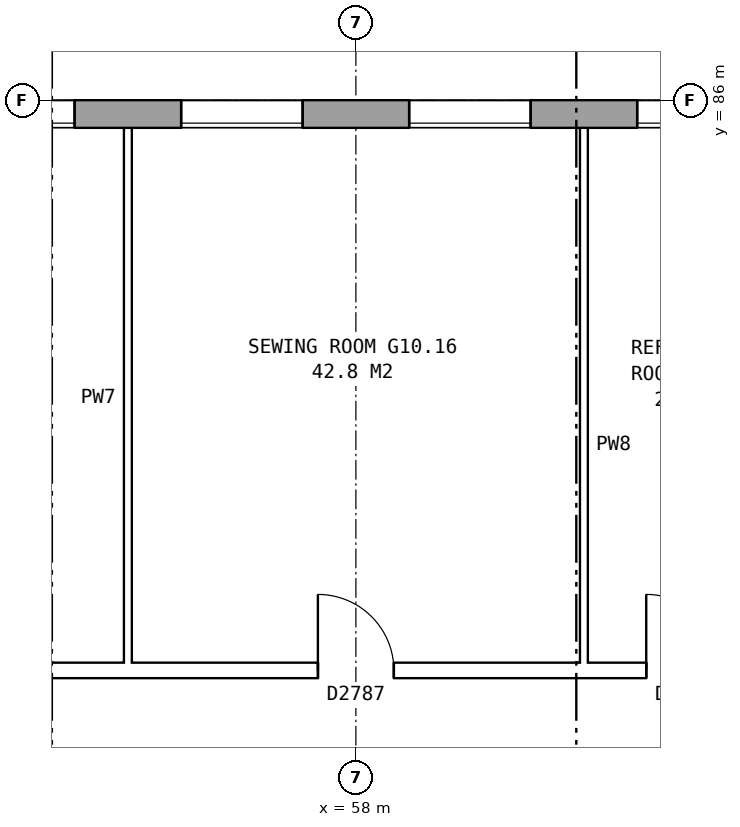
"""IFC4 building model, lengths in metres.
Left out: names, types, materials, properties, quantities, classifications, styles, units other than length and angle.
Written with IfcOpenShell. Run it as: python <this file> out.ifc"""

import sys

from ifc_helpers import new_model, si_unit, direction, frame, frame_2d, origin, place, context, subcontext, project, spatial, rectangle, extrude, element, fill, save


model = new_model("IFC4")
c1 = context("Model", 3, precision=1e-05, world=origin(), true_north=direction((0.0, 1.0)))
c2 = subcontext(c1, "Body", "Model", "MODEL_VIEW")
j1 = project(units=[si_unit("LENGTHUNIT", "METRE"), si_unit("PLANEANGLEUNIT", "RADIAN")], contexts=[c1])
p1 = place(None, origin())
s1 = spatial("IfcSite", under=j1, at=p1, CompositionType="ELEMENT")
p2 = place(p1, origin())
s2 = spatial("IfcBuilding", under=s1, at=p2, CompositionType="ELEMENT")
p3 = place(p2, frame((0.0, 0.0, 38.1)))
s3 = spatial("IfcBuildingStorey", under=s2, at=p3, CompositionType="ELEMENT", Elevation=38.1)
p4 = place(p3, frame((72.925, 85.82, 0.0), z_axis=(0.0, 0.0, 1.0), x_axis=(-1.0, 0.0, 0.0)))
e1 = element("IfcWall", 1, at=p4, inside=s3, PredefinedType="STANDARD", context=c2, shape_type="SweptSolid", body=[
    extrude(rectangle(XDim=48.351, YDim=0.36, at=frame_2d((24.175, 0.0))), origin(), (0.0, 0.0, 1.0), 5.6),
])
p5 = place(p4, frame((0.625, 0.0, 0.15)))
e2 = element("IfcOpeningElement", 2, at=p5, cuts=e1, PredefinedType="OPENING", context=c2, shape_type="SweptSolid", body=[
    extrude(rectangle(XDim=1.6, YDim=2.4, at=frame_2d((0.8, 1.2))), frame((0.0, 0.19, 0.0), z_axis=(0.0, -1.0, 0.0), x_axis=(1.0, 0.0, 0.0)), (0.0, 0.0, 1.0), 0.38),
])
p6 = place(p4, frame((3.625, 0.0, 0.15)))
e3 = element("IfcOpeningElement", 3, at=p6, cuts=e1, PredefinedType="OPENING", context=c2, shape_type="SweptSolid", body=[
    extrude(rectangle(XDim=1.6, YDim=2.4, at=frame_2d((0.8, 1.2))), frame((0.0, 0.19, 0.0), z_axis=(0.0, -1.0, 0.0), x_axis=(1.0, 0.0, 0.0)), (0.0, 0.0, 1.0), 0.38),
])
p7 = place(p4, frame((6.625, 0.0, 0.15)))
e4 = element("IfcOpeningElement", 4, at=p7, cuts=e1, PredefinedType="OPENING", context=c2, shape_type="SweptSolid", body=[
    extrude(rectangle(XDim=1.6, YDim=2.4, at=frame_2d((0.8, 1.2))), frame((0.0, 0.19, 0.0), z_axis=(0.0, -1.0, 0.0), x_axis=(1.0, 0.0, 0.0)), (0.0, 0.0, 1.0), 0.38),
])
p8 = place(p4, frame((9.625, 0.0, 0.15)))
e5 = element("IfcOpeningElement", 5, at=p8, cuts=e1, PredefinedType="OPENING", context=c2, shape_type="SweptSolid", body=[
    extrude(rectangle(XDim=1.6, YDim=2.4, at=frame_2d((0.8, 1.2))), frame((0.0, 0.19, 0.0), z_axis=(0.0, -1.0, 0.0), x_axis=(1.0, 0.0, 0.0)), (0.0, 0.0, 1.0), 0.38),
])
p9 = place(p4, frame((12.625, 0.0, 0.15)))
e6 = element("IfcOpeningElement", 6, at=p9, cuts=e1, PredefinedType="OPENING", context=c2, shape_type="SweptSolid", body=[
    extrude(rectangle(XDim=1.6, YDim=2.4, at=frame_2d((0.8, 1.2))), frame((0.0, 0.19, 0.0), z_axis=(0.0, -1.0, 0.0), x_axis=(1.0, 0.0, 0.0)), (0.0, 0.0, 1.0), 0.38),
])
p10 = place(p4, frame((15.625, 0.0, 0.15)))
e7 = element("IfcOpeningElement", 7, at=p10, cuts=e1, PredefinedType="OPENING", context=c2, shape_type="SweptSolid", body=[
    extrude(rectangle(XDim=1.6, YDim=2.4, at=frame_2d((0.8, 1.2))), frame((0.0, 0.19, 0.0), z_axis=(0.0, -1.0, 0.0), x_axis=(1.0, 0.0, 0.0)), (0.0, 0.0, 1.0), 0.38),
])
p11 = place(p4, frame((18.625, 0.0, 0.15)))
e8 = element("IfcOpeningElement", 8, at=p11, cuts=e1, PredefinedType="OPENING", context=c2, shape_type="SweptSolid", body=[
    extrude(rectangle(XDim=1.6, YDim=2.4, at=frame_2d((0.8, 1.2))), frame((0.0, 0.19, 0.0), z_axis=(0.0, -1.0, 0.0), x_axis=(1.0, 0.0, 0.0)), (0.0, 0.0, 1.0), 0.38),
])
p12 = place(p4, frame((21.625, 0.0, 0.15)))
e9 = element("IfcOpeningElement", 9, at=p12, cuts=e1, PredefinedType="OPENING", context=c2, shape_type="SweptSolid", body=[
    extrude(rectangle(XDim=1.6, YDim=2.4, at=frame_2d((0.8, 1.2))), frame((0.0, 0.19, 0.0), z_axis=(0.0, -1.0, 0.0), x_axis=(1.0, 0.0, 0.0)), (0.0, 0.0, 1.0), 0.38),
])
p13 = place(p4, frame((24.625, 0.0, 0.15)))
e10 = element("IfcOpeningElement", 10, at=p13, cuts=e1, PredefinedType="OPENING", context=c2, shape_type="SweptSolid", body=[
    extrude(rectangle(XDim=1.6, YDim=2.4, at=frame_2d((0.8, 1.2))), frame((0.0, 0.19, 0.0), z_axis=(0.0, -1.0, 0.0), x_axis=(1.0, 0.0, 0.0)), (0.0, 0.0, 1.0), 0.38),
])
p14 = place(p4, frame((27.625, 0.0, 0.15)))
e11 = element("IfcOpeningElement", 11, at=p14, cuts=e1, PredefinedType="OPENING", context=c2, shape_type="SweptSolid", body=[
    extrude(rectangle(XDim=1.6, YDim=2.4, at=frame_2d((0.8, 1.2))), frame((0.0, 0.19, 0.0), z_axis=(0.0, -1.0, 0.0), x_axis=(1.0, 0.0, 0.0)), (0.0, 0.0, 1.0), 0.38),
])
p15 = place(p4, frame((30.625, 0.0, 0.15)))
e12 = element("IfcOpeningElement", 12, at=p15, cuts=e1, PredefinedType="OPENING", context=c2, shape_type="SweptSolid", body=[
    extrude(rectangle(XDim=1.6, YDim=2.4, at=frame_2d((0.8, 1.2))), frame((0.0, 0.19, 0.0), z_axis=(0.0, -1.0, 0.0), x_axis=(1.0, 0.0, 0.0)), (0.0, 0.0, 1.0), 0.38),
])
p16 = place(p4, frame((33.625, 0.0, 0.15)))
e13 = element("IfcOpeningElement", 13, at=p16, cuts=e1, PredefinedType="OPENING", context=c2, shape_type="SweptSolid", body=[
    extrude(rectangle(XDim=1.6, YDim=2.4, at=frame_2d((0.8, 1.2))), frame((0.0, 0.19, 0.0), z_axis=(0.0, -1.0, 0.0), x_axis=(1.0, 0.0, 0.0)), (0.0, 0.0, 1.0), 0.38),
])
p17 = place(p4, frame((36.625, 0.0, 0.15)))
e14 = element("IfcOpeningElement", 14, at=p17, cuts=e1, PredefinedType="OPENING", context=c2, shape_type="SweptSolid", body=[
    extrude(rectangle(XDim=1.6, YDim=2.4, at=frame_2d((0.8, 1.2))), frame((0.0, 0.19, 0.0), z_axis=(0.0, -1.0, 0.0), x_axis=(1.0, 0.0, 0.0)), (0.0, 0.0, 1.0), 0.38),
])
p18 = place(p4, frame((39.625, 0.0, 0.15)))
e15 = element("IfcOpeningElement", 15, at=p18, cuts=e1, PredefinedType="OPENING", context=c2, shape_type="SweptSolid", body=[
    extrude(rectangle(XDim=1.6, YDim=2.4, at=frame_2d((0.8, 1.2))), frame((0.0, 0.19, 0.0), z_axis=(0.0, -1.0, 0.0), x_axis=(1.0, 0.0, 0.0)), (0.0, 0.0, 1.0), 0.38),
])
p19 = place(p4, frame((42.625, 0.0, 0.15)))
e16 = element("IfcOpeningElement", 16, at=p19, cuts=e1, PredefinedType="OPENING", context=c2, shape_type="SweptSolid", body=[
    extrude(rectangle(XDim=1.6, YDim=2.4, at=frame_2d((0.8, 1.2))), frame((0.0, 0.19, 0.0), z_axis=(0.0, -1.0, 0.0), x_axis=(1.0, 0.0, 0.0)), (0.0, 0.0, 1.0), 0.38),
])
p20 = place(p4, frame((45.625, 0.0, 0.15)))
e17 = element("IfcOpeningElement", 17, at=p20, cuts=e1, PredefinedType="OPENING", context=c2, shape_type="SweptSolid", body=[
    extrude(rectangle(XDim=1.6, YDim=2.4, at=frame_2d((0.8, 1.2))), frame((0.0, 0.19, 0.0), z_axis=(0.0, -1.0, 0.0), x_axis=(1.0, 0.0, 0.0)), (0.0, 0.0, 1.0), 0.38),
])
p21 = place(p3, frame((24.9, 78.5, 0.0), z_axis=(0.0, 0.0, 1.0), x_axis=(1.0, 0.0, 0.0)))
e18 = element("IfcWall", 18, at=p21, inside=s3, PredefinedType="PARTITIONING", context=c2, shape_type="SweptSolid", body=[
    extrude(rectangle(XDim=50.86, YDim=0.2, at=frame_2d((25.43, 0.0))), origin(), (0.0, 0.0, 1.0), 5.6),
])
p22 = place(p21, frame((3.5, 0.0, 0.0)))
e19 = element("IfcOpeningElement", 19, at=p22, cuts=e18, PredefinedType="OPENING", context=c2, shape_type="SweptSolid", body=[
    extrude(rectangle(XDim=1.0, YDim=2.1, at=frame_2d((0.5, 1.05))), frame((0.0, 0.11, 0.0), z_axis=(0.0, -1.0, 0.0), x_axis=(1.0, 0.0, 0.0)), (0.0, 0.0, 1.0), 0.22),
])
p23 = place(p21, frame((8.6, 0.0, 0.0)))
e20 = element("IfcOpeningElement", 20, at=p23, cuts=e18, PredefinedType="OPENING", context=c2, shape_type="SweptSolid", body=[
    extrude(rectangle(XDim=1.0, YDim=2.1, at=frame_2d((0.5, 1.05))), frame((0.0, 0.11, 0.0), z_axis=(0.0, -1.0, 0.0), x_axis=(1.0, 0.0, 0.0)), (0.0, 0.0, 1.0), 0.22),
])
p24 = place(p21, frame((15.5, 0.0, 0.0)))
e21 = element("IfcOpeningElement", 21, at=p24, cuts=e18, PredefinedType="OPENING", context=c2, shape_type="SweptSolid", body=[
    extrude(rectangle(XDim=1.0, YDim=2.1, at=frame_2d((0.5, 1.05))), frame((0.0, 0.11, 0.0), z_axis=(0.0, -1.0, 0.0), x_axis=(1.0, 0.0, 0.0)), (0.0, 0.0, 1.0), 0.22),
])
p25 = place(p21, frame((20.6, 0.0, 0.0)))
e22 = element("IfcOpeningElement", 22, at=p25, cuts=e18, PredefinedType="OPENING", context=c2, shape_type="SweptSolid", body=[
    extrude(rectangle(XDim=1.0, YDim=2.1, at=frame_2d((0.5, 1.05))), frame((0.0, 0.11, 0.0), z_axis=(0.0, -1.0, 0.0), x_axis=(1.0, 0.0, 0.0)), (0.0, 0.0, 1.0), 0.22),
])
p26 = place(p21, frame((27.5, 0.0, 0.0)))
e23 = element("IfcOpeningElement", 23, at=p26, cuts=e18, PredefinedType="OPENING", context=c2, shape_type="SweptSolid", body=[
    extrude(rectangle(XDim=1.0, YDim=2.1, at=frame_2d((0.5, 1.05))), frame((0.0, 0.11, 0.0), z_axis=(0.0, -1.0, 0.0), x_axis=(1.0, 0.0, 0.0)), (0.0, 0.0, 1.0), 0.22),
])
p27 = place(p21, frame((32.6, 0.0, 0.0)))
e24 = element("IfcOpeningElement", 24, at=p27, cuts=e18, PredefinedType="OPENING", context=c2, shape_type="SweptSolid", body=[
    extrude(rectangle(XDim=1.0, YDim=2.1, at=frame_2d((0.5, 1.05))), frame((0.0, 0.11, 0.0), z_axis=(0.0, -1.0, 0.0), x_axis=(1.0, 0.0, 0.0)), (0.0, 0.0, 1.0), 0.22),
])
p28 = place(p21, frame((36.92, 0.0, 0.0)))
e25 = element("IfcOpeningElement", 25, at=p28, cuts=e18, PredefinedType="OPENING", context=c2, shape_type="SweptSolid", body=[
    extrude(rectangle(XDim=1.0, YDim=2.1, at=frame_2d((0.5, 1.05))), frame((0.0, 0.11, 0.0), z_axis=(0.0, -1.0, 0.0), x_axis=(1.0, 0.0, 0.0)), (0.0, 0.0, 1.0), 0.22),
])
p29 = place(p21, frame((39.97, 0.0, 0.0)))
e26 = element("IfcOpeningElement", 26, at=p29, cuts=e18, PredefinedType="OPENING", context=c2, shape_type="SweptSolid", body=[
    extrude(rectangle(XDim=0.9, YDim=2.1, at=frame_2d((0.45, 1.05))), frame((0.0, 0.11, 0.0), z_axis=(0.0, -1.0, 0.0), x_axis=(1.0, 0.0, 0.0)), (0.0, 0.0, 1.0), 0.22),
])
p30 = place(p21, frame((43.15, 0.0, 0.0)))
e27 = element("IfcOpeningElement", 27, at=p30, cuts=e18, PredefinedType="OPENING", context=c2, shape_type="SweptSolid", body=[
    extrude(rectangle(XDim=0.9, YDim=2.1, at=frame_2d((0.45, 1.05))), frame((0.0, 0.11, 0.0), z_axis=(0.0, -1.0, 0.0), x_axis=(1.0, 0.0, 0.0)), (0.0, 0.0, 1.0), 0.22),
])
p31 = place(p21, frame((46.15, 0.0, 0.0)))
e28 = element("IfcOpeningElement", 28, at=p31, cuts=e18, PredefinedType="OPENING", context=c2, shape_type="SweptSolid", body=[
    extrude(rectangle(XDim=0.9, YDim=2.1, at=frame_2d((0.45, 1.05))), frame((0.0, 0.11, 0.0), z_axis=(0.0, -1.0, 0.0), x_axis=(1.0, 0.0, 0.0)), (0.0, 0.0, 1.0), 0.22),
])
p32 = place(p21, frame((48.92, 0.0, 0.0)))
e29 = element("IfcOpeningElement", 29, at=p32, cuts=e18, PredefinedType="OPENING", context=c2, shape_type="SweptSolid", body=[
    extrude(rectangle(XDim=1.0, YDim=2.1, at=frame_2d((0.5, 1.05))), frame((0.0, 0.11, 0.0), z_axis=(0.0, -1.0, 0.0), x_axis=(1.0, 0.0, 0.0)), (0.0, 0.0, 1.0), 0.22),
])
for number, where, z_axis, x_axis in (
    (30, (55.0, 78.4, 0.0), (0.0, 0.0, 1.0), (0.0, 1.0, 0.0)),
    (31, (61.0, 78.4, 0.0), (0.0, 0.0, 1.0), (0.0, 1.0, 0.0)),
):
    element("IfcWall", number, at=place(p3, frame(where, z_axis=z_axis, x_axis=x_axis)), inside=s3, PredefinedType="PARTITIONING", context=c2, shape_type="SweptSolid", body=[
        extrude(rectangle(XDim=7.36, YDim=0.1, at=frame_2d((3.68, 0.0))), origin(), (0.0, 0.0, 1.0), 5.6),
    ])
p33 = place(p8, origin())
e32 = element("IfcWindow", 32, at=p33, inside=s3, PartitioningType="SINGLE_PANEL", PredefinedType="WINDOW", context=c2, shape_type="SweptSolid", body=[
    extrude(rectangle(XDim=1.6, YDim=2.4, at=frame_2d((0.8, 1.2))), frame((0.0, 0.15, 0.0), z_axis=(0.0, -1.0, 0.0), x_axis=(1.0, 0.0, 0.0)), (0.0, 0.0, 1.0), 0.06),
])
fill(e5, e32)
p34 = place(p9, origin())
e33 = element("IfcWindow", 33, at=p34, inside=s3, PartitioningType="SINGLE_PANEL", PredefinedType="WINDOW", context=c2, shape_type="SweptSolid", body=[
    extrude(rectangle(XDim=1.6, YDim=2.4, at=frame_2d((0.8, 1.2))), frame((0.0, 0.15, 0.0), z_axis=(0.0, -1.0, 0.0), x_axis=(1.0, 0.0, 0.0)), (0.0, 0.0, 1.0), 0.06),
])
fill(e6, e33)
p35 = place(p10, origin())
e34 = element("IfcWindow", 34, at=p35, inside=s3, PartitioningType="SINGLE_PANEL", PredefinedType="WINDOW", context=c2, shape_type="SweptSolid", body=[
    extrude(rectangle(XDim=1.6, YDim=2.4, at=frame_2d((0.8, 1.2))), frame((0.0, 0.15, 0.0), z_axis=(0.0, -1.0, 0.0), x_axis=(1.0, 0.0, 0.0)), (0.0, 0.0, 1.0), 0.06),
])
fill(e7, e34)
p36 = place(p11, origin())
e35 = element("IfcWindow", 35, at=p36, inside=s3, PartitioningType="SINGLE_PANEL", PredefinedType="WINDOW", context=c2, shape_type="SweptSolid", body=[
    extrude(rectangle(XDim=1.6, YDim=2.4, at=frame_2d((0.8, 1.2))), frame((0.0, 0.15, 0.0), z_axis=(0.0, -1.0, 0.0), x_axis=(1.0, 0.0, 0.0)), (0.0, 0.0, 1.0), 0.06),
])
fill(e8, e35)
p37 = place(p27, origin())
e36 = element("IfcDoor", 36, at=p37, inside=s3, OperationType="SINGLE_SWING_LEFT", PredefinedType="DOOR", context=c2, shape_type="SweptSolid", body=[
    extrude(rectangle(XDim=1.0, YDim=2.1, at=frame_2d((0.5, 1.05))), frame((0.0, 0.025, 0.0), z_axis=(0.0, -1.0, 0.0), x_axis=(1.0, 0.0, 0.0)), (0.0, 0.0, 1.0), 0.05),
])
fill(e24, e36)
p38 = place(p28, origin())
e37 = element("IfcDoor", 37, at=p38, inside=s3, OperationType="SINGLE_SWING_LEFT", PredefinedType="DOOR", context=c2, shape_type="SweptSolid", body=[
    extrude(rectangle(XDim=1.0, YDim=2.1, at=frame_2d((0.5, 1.05))), frame((0.0, 0.025, 0.0), z_axis=(0.0, -1.0, 0.0), x_axis=(1.0, 0.0, 0.0)), (0.0, 0.0, 1.0), 0.05),
])
fill(e25, e37)
save(model, sys.argv[1])
